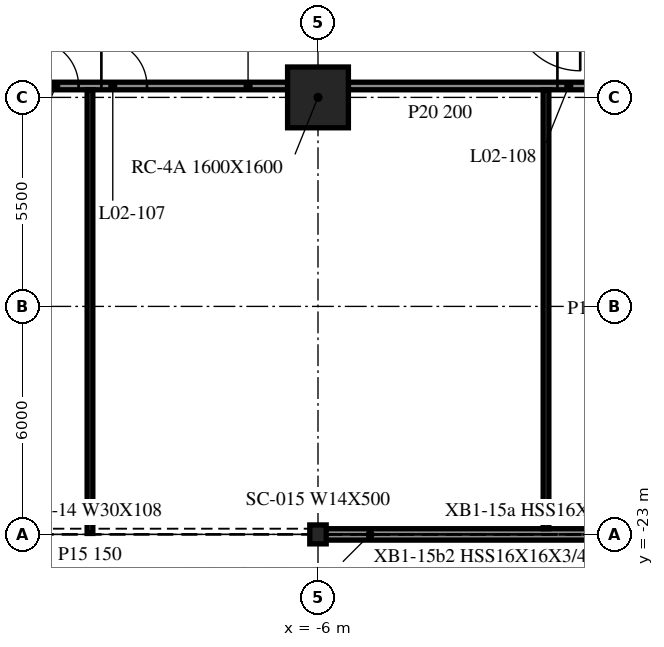
"""IFC4 building model, lengths in metres.
Left out: names, types, materials, properties, quantities, classifications, styles, units other than length and angle.
Written with IfcOpenShell. Run it as: python <this file> out.ifc"""

import sys

from ifc_helpers import new_model, si_unit, direction, frame, frame_2d, origin, origin_2d, place, context, subcontext, project, spatial, rectangle, i_section, extrude, element, fill, save


model = new_model("IFC4")
c1 = context("Model", 3, precision=1e-05, world=origin(), true_north=direction((0.0, 1.0)))
c2 = subcontext(c1, "Body", "Model", "MODEL_VIEW")
j1 = project(units=[si_unit("LENGTHUNIT", "METRE"), si_unit("PLANEANGLEUNIT", "RADIAN")], contexts=[c1])
p1 = place(None, origin())
s1 = spatial("IfcSite", under=j1, at=p1, CompositionType="ELEMENT")
p2 = place(p1, origin())
s2 = spatial("IfcBuilding", under=s1, at=p2, CompositionType="ELEMENT")
p3 = place(p2, frame((0.0, 0.0, 11.5)))
s3 = spatial("IfcBuildingStorey", under=s2, at=p3, CompositionType="ELEMENT", Elevation=11.5)
p4 = place(p3, frame((-6.0, -11.5, -0.34), z_axis=(0.0, 0.0, 1.0), x_axis=(1.0, 0.0, 0.0)))
e1 = element("IfcColumn", 1, at=p4, inside=s3, PredefinedType="COLUMN", context=c2, shape_type="SweptSolid", body=[
    extrude(rectangle(XDim=1.6, YDim=1.6, at=origin_2d()), origin(), (0.0, 0.0, 1.0), 4.3),
])
p5 = place(p3, frame((-6.0, -23.0, -0.34), z_axis=(0.0, 0.0, 1.0), x_axis=(1.0, 0.0, 0.0)))
e2 = element("IfcColumn", 2, at=p5, inside=s3, PredefinedType="COLUMN", context=c2, shape_type="SweptSolid", body=[
    extrude(i_section(OverallWidth=0.432, OverallDepth=0.498, WebThickness=0.056, FlangeThickness=0.089, at=origin_2d()), origin(), (0.0, 0.0, 1.0), 4.3),
])
p6 = place(p3, frame((-5.972, -23.0, 0.0), z_axis=(0.0, 0.0, 1.0), x_axis=(1.0, 0.0, 0.0)))
e3 = element("IfcWall", 3, at=p6, inside=s3, PredefinedType="NOTDEFINED", context=c2, shape_type="SweptSolid", body=[
    extrude(rectangle(XDim=11.944, YDim=0.3, at=frame_2d((5.972, 0.0))), origin(), (0.0, 0.0, 1.0), 3.203),
])
p7 = place(p3, frame((-17.2, -11.2, 0.0), z_axis=(0.0, 0.0, 1.0), x_axis=(1.0, 0.0, 0.0)))
e4 = element("IfcWall", 4, at=p7, inside=s3, PredefinedType="PARTITIONING", context=c2, shape_type="SweptSolid", body=[
    extrude(rectangle(XDim=10.4, YDim=0.2, at=frame_2d((5.2, 0.0))), origin(), (0.0, 0.0, 1.0), 3.96),
])
p8 = place(p7, frame((3.7, 0.0, 0.0)))
e5 = element("IfcOpeningElement", 5, at=p8, cuts=e4, PredefinedType="OPENING", context=c2, shape_type="SweptSolid", body=[
    extrude(rectangle(XDim=1.2, YDim=2.1, at=frame_2d((0.6, 1.05))), frame((0.0, 0.11, 0.0), z_axis=(0.0, -1.0, 0.0), x_axis=(1.0, 0.0, 0.0)), (0.0, 0.0, 1.0), 0.22),
])
p9 = place(p7, frame((5.5, 0.0, 0.0)))
e6 = element("IfcOpeningElement", 6, at=p9, cuts=e4, PredefinedType="OPENING", context=c2, shape_type="SweptSolid", body=[
    extrude(rectangle(XDim=1.2, YDim=2.1, at=frame_2d((0.6, 1.05))), frame((0.0, 0.11, 0.0), z_axis=(0.0, -1.0, 0.0), x_axis=(1.0, 0.0, 0.0)), (0.0, 0.0, 1.0), 0.22),
])
p10 = place(p3, frame((-5.2, -11.2, 0.0), z_axis=(0.0, 0.0, 1.0), x_axis=(1.0, 0.0, 0.0)))
e7 = element("IfcWall", 7, at=p10, inside=s3, PredefinedType="PARTITIONING", context=c2, shape_type="SweptSolid", body=[
    extrude(rectangle(XDim=10.4, YDim=0.2, at=frame_2d((5.2, 0.0))), origin(), (0.0, 0.0, 1.0), 3.96),
])
p11 = place(p10, frame((5.5, 0.0, 0.0)))
e8 = element("IfcOpeningElement", 8, at=p11, cuts=e7, PredefinedType="OPENING", context=c2, shape_type="SweptSolid", body=[
    extrude(rectangle(XDim=1.2, YDim=2.1, at=frame_2d((0.6, 1.05))), frame((0.0, 0.11, 0.0), z_axis=(0.0, -1.0, 0.0), x_axis=(1.0, 0.0, 0.0)), (0.0, 0.0, 1.0), 0.22),
])
p12 = place(p3, frame((-12.0, -22.975, 0.0), z_axis=(0.0, 0.0, 1.0), x_axis=(0.0, 1.0, 0.0)))
e9 = element("IfcWall", 9, at=p12, inside=s3, PredefinedType="PARTITIONING", context=c2, shape_type="SweptSolid", body=[
    extrude(rectangle(XDim=11.675, YDim=0.15, at=frame_2d((5.837, 0.0))), origin(), (0.0, 0.0, 1.0), 3.96),
])
p13 = place(p3, frame((0.0, -22.85, 0.0), z_axis=(0.0, 0.0, 1.0), x_axis=(0.0, 1.0, 0.0)))
e10 = element("IfcWall", 10, at=p13, inside=s3, PredefinedType="PARTITIONING", context=c2, shape_type="SweptSolid", body=[
    extrude(rectangle(XDim=11.55, YDim=0.15, at=frame_2d((5.775, 0.0))), origin(), (0.0, 0.0, 1.0), 3.96),
])
p14 = place(p8, origin())
e11 = element("IfcDoor", 11, at=p14, inside=s3, OperationType="SINGLE_SWING_RIGHT", PredefinedType="DOOR", context=c2, shape_type="SweptSolid", body=[
    extrude(rectangle(XDim=1.2, YDim=2.1, at=frame_2d((0.6, 1.05))), frame((0.0, 0.025, 0.0), z_axis=(0.0, -1.0, 0.0), x_axis=(1.0, 0.0, 0.0)), (0.0, 0.0, 1.0), 0.05),
])
fill(e5, e11)
p15 = place(p9, origin())
e12 = element("IfcDoor", 12, at=p15, inside=s3, OperationType="SINGLE_SWING_LEFT", PredefinedType="DOOR", context=c2, shape_type="SweptSolid", body=[
    extrude(rectangle(XDim=1.2, YDim=2.1, at=frame_2d((0.6, 1.05))), frame((0.0, 0.025, 0.0), z_axis=(0.0, -1.0, 0.0), x_axis=(1.0, 0.0, 0.0)), (0.0, 0.0, 1.0), 0.05),
])
fill(e6, e12)
p16 = place(p11, origin())
e13 = element("IfcDoor", 13, at=p16, inside=s3, OperationType="SINGLE_SWING_LEFT", PredefinedType="DOOR", context=c2, shape_type="SweptSolid", body=[
    extrude(rectangle(XDim=1.2, YDim=2.1, at=frame_2d((0.6, 1.05))), frame((0.0, 0.025, 0.0), z_axis=(0.0, -1.0, 0.0), x_axis=(1.0, 0.0, 0.0)), (0.0, 0.0, 1.0), 0.05),
])
fill(e8, e13)
save(model, sys.argv[1])
